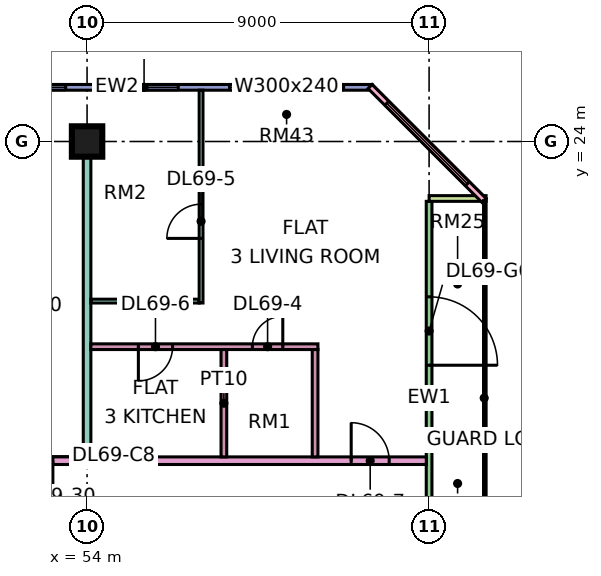
"""IFC4 building model, lengths in metres.
Left out: names, types, materials, properties, quantities, classifications, styles, units other than length and angle.
Written with IfcOpenShell. Run it as: python <this file> out.ifc"""

import sys

from ifc_helpers import new_model, si_unit, direction, frame, frame_2d, origin, origin_2d, place, context, subcontext, project, spatial, rectangle, extrude, element, fill, save


model = new_model("IFC4")
c1 = context("Model", 3, precision=1e-05, world=origin(), true_north=direction((0.0, 1.0)))
c2 = subcontext(c1, "Body", "Model", "MODEL_VIEW")
j1 = project(units=[si_unit("LENGTHUNIT", "METRE"), si_unit("PLANEANGLEUNIT", "RADIAN")], contexts=[c1])
p1 = place(None, origin())
s1 = spatial("IfcSite", under=j1, at=p1, CompositionType="ELEMENT")
p2 = place(p1, origin())
s2 = spatial("IfcBuilding", under=s1, at=p2, CompositionType="ELEMENT")
p3 = place(p2, frame((0.0, 0.0, 295.9)))
s3 = spatial("IfcBuildingStorey", under=s2, at=p3, CompositionType="ELEMENT", Elevation=295.9)
p4 = place(p3, frame((54.0, 24.0, 0.0), z_axis=(0.0, 0.0, 1.0), x_axis=(1.0, 0.0, 0.0)))
e1 = element("IfcColumn", 1, at=p4, inside=s3, PredefinedType="COLUMN", context=c2, shape_type="SweptSolid", body=[
    extrude(rectangle(XDim=0.8, YDim=0.8, at=origin_2d()), origin(), (0.0, 0.0, 1.0), 3.75),
])
p5 = place(p3, frame((61.5, 25.425, 0.0), z_axis=(0.0, 0.0, 1.0), x_axis=(-1.0, 0.0, 0.0)))
e2 = element("IfcWall", 2, at=p5, inside=s3, PredefinedType="SOLIDWALL", context=c2, shape_type="SweptSolid", body=[
    extrude(rectangle(XDim=13.425, YDim=0.15, at=frame_2d((6.712, 0.0))), origin(), (0.0, 0.0, 1.0), 3.35),
])
p6 = place(p5, frame((0.75, 0.0, 0.45)))
e3 = element("IfcOpeningElement", 3, at=p6, cuts=e2, PredefinedType="OPENING", context=c2, shape_type="SweptSolid", body=[
    extrude(rectangle(XDim=3.0, YDim=2.4, at=frame_2d((1.5, 1.2))), frame((0.0, 0.085, 0.0), z_axis=(0.0, -1.0, 0.0), x_axis=(1.0, 0.0, 0.0)), (0.0, 0.0, 1.0), 0.17),
])
p7 = place(p5, frame((5.1, 0.0, 0.45)))
e4 = element("IfcOpeningElement", 4, at=p7, cuts=e2, PredefinedType="OPENING", context=c2, shape_type="SweptSolid", body=[
    extrude(rectangle(XDim=1.8, YDim=2.4, at=frame_2d((0.9, 1.2))), frame((0.0, 0.085, 0.0), z_axis=(0.0, -1.0, 0.0), x_axis=(1.0, 0.0, 0.0)), (0.0, 0.0, 1.0), 0.17),
])
p8 = place(p5, frame((8.062, 0.0, 0.45)))
e5 = element("IfcOpeningElement", 5, at=p8, cuts=e2, PredefinedType="OPENING", context=c2, shape_type="SweptSolid", body=[
    extrude(rectangle(XDim=4.8, YDim=2.4, at=frame_2d((2.4, 1.2))), frame((0.0, 0.085, 0.0), z_axis=(0.0, -1.0, 0.0), x_axis=(1.0, 0.0, 0.0)), (0.0, 0.0, 1.0), 0.17),
])
p9 = place(p3, frame((63.0, 12.075, 0.0), z_axis=(0.0, 0.0, 1.0), x_axis=(0.0, 1.0, 0.0)))
e6 = element("IfcWall", 6, at=p9, inside=s3, PredefinedType="SOLIDWALL", context=c2, shape_type="SweptSolid", body=[
    extrude(rectangle(XDim=10.35, YDim=0.15, at=frame_2d((5.175, 0.0))), origin(), (0.0, 0.0, 1.0), 3.35),
])
p10 = place(p9, frame((6.038, 0.0, 0.0)))
e7 = element("IfcOpeningElement", 7, at=p10, cuts=e6, PredefinedType="OPENING", context=c2, shape_type="SweptSolid", body=[
    extrude(rectangle(XDim=1.8, YDim=2.4, at=frame_2d((0.9, 1.2))), frame((0.0, 0.085, 0.0), z_axis=(0.0, -1.0, 0.0), x_axis=(1.0, 0.0, 0.0)), (0.0, 0.0, 1.0), 0.17),
])
p11 = place(p3, frame((64.5, 22.5, 0.0), z_axis=(0.0, 0.0, 1.0), x_axis=(-1.0, 0.0, 0.0)))
e8 = element("IfcWall", 8, at=p11, inside=s3, PredefinedType="SOLIDWALL", context=c2, shape_type="SweptSolid", body=[
    extrude(rectangle(XDim=1.5, YDim=0.15, at=frame_2d((0.75, 0.0))), origin(), (0.0, 0.0, 1.0), 3.35),
])
p12 = place(p3, frame((64.447, 22.447, 0.0), z_axis=(0.0, 0.0, 1.0), x_axis=(-0.707106781187, 0.707106781187, 0.0)))
e9 = element("IfcWall", 9, at=p12, inside=s3, PredefinedType="SOLIDWALL", context=c2, shape_type="SweptSolid", body=[
    extrude(rectangle(XDim=4.243, YDim=0.15, at=frame_2d((2.121, 0.0))), origin(), (0.0, 0.0, 1.0), 3.35),
])
p13 = place(p12, frame((0.621, 0.0, 0.45)))
e10 = element("IfcOpeningElement", 10, at=p13, cuts=e9, PredefinedType="OPENING", context=c2, shape_type="SweptSolid", body=[
    extrude(rectangle(XDim=3.0, YDim=2.4, at=frame_2d((1.5, 1.2))), frame((0.0, 0.085, 0.0), z_axis=(0.0, -1.0, 0.0), x_axis=(1.0, 0.0, 0.0)), (0.0, 0.0, 1.0), 0.17),
])
p14 = place(p3, frame((51.225, 15.6, 0.0), z_axis=(0.0, 0.0, 1.0), x_axis=(1.0, 0.0, 0.0)))
e11 = element("IfcWall", 11, at=p14, inside=s3, PredefinedType="PARTITIONING", context=c2, shape_type="SweptSolid", body=[
    extrude(rectangle(XDim=11.701, YDim=0.2, at=frame_2d((5.851, 0.0))), origin(), (0.0, 0.0, 1.0), 3.35),
])
p15 = place(p14, frame((9.725, 0.0, 0.0)))
e12 = element("IfcOpeningElement", 12, at=p15, cuts=e11, PredefinedType="OPENING", context=c2, shape_type="SweptSolid", body=[
    extrude(rectangle(XDim=1.0, YDim=2.1, at=frame_2d((0.5, 1.05))), frame((0.0, 0.11, 0.0), z_axis=(0.0, -1.0, 0.0), x_axis=(1.0, 0.0, 0.0)), (0.0, 0.0, 1.0), 0.22),
])
p16 = place(p14, frame((0.875, 0.0, 0.0)))
e13 = element("IfcOpeningElement", 13, at=p16, cuts=e11, PredefinedType="OPENING", context=c2, shape_type="SweptSolid", body=[
    extrude(rectangle(XDim=1.0, YDim=2.1, at=frame_2d((0.5, 1.05))), frame((0.0, 0.11, 0.0), z_axis=(0.0, -1.0, 0.0), x_axis=(1.0, 0.0, 0.0)), (0.0, 0.0, 1.0), 0.22),
])
p17 = place(p3, frame((54.0, 15.7, 0.0), z_axis=(0.0, 0.0, 1.0), x_axis=(0.0, 1.0, 0.0)))
e14 = element("IfcWall", 14, at=p17, inside=s3, PredefinedType="PARTITIONING", context=c2, shape_type="SweptSolid", body=[
    extrude(rectangle(XDim=8.3, YDim=0.2, at=frame_2d((4.15, 0.0))), origin(), (0.0, 0.0, 1.0), 3.35),
])
p18 = place(p3, frame((54.1, 18.6, 0.0), z_axis=(0.0, 0.0, 1.0), x_axis=(1.0, 0.0, 0.0)))
e15 = element("IfcWall", 15, at=p18, inside=s3, PredefinedType="PARTITIONING", context=c2, shape_type="SweptSolid", body=[
    extrude(rectangle(XDim=5.975, YDim=0.15, at=frame_2d((2.987, 0.0))), origin(), (0.0, 0.0, 1.0), 3.35),
])
p19 = place(p18, frame((4.25, 0.0, 0.0)))
e16 = element("IfcOpeningElement", 16, at=p19, cuts=e15, PredefinedType="OPENING", context=c2, shape_type="SweptSolid", body=[
    extrude(rectangle(XDim=0.8, YDim=2.1, at=frame_2d((0.4, 1.05))), frame((0.0, 0.085, 0.0), z_axis=(0.0, -1.0, 0.0), x_axis=(1.0, 0.0, 0.0)), (0.0, 0.0, 1.0), 0.17),
])
p20 = place(p18, frame((1.25, 0.0, 0.0)))
e17 = element("IfcOpeningElement", 17, at=p20, cuts=e15, PredefinedType="OPENING", context=c2, shape_type="SweptSolid", body=[
    extrude(rectangle(XDim=0.9, YDim=2.1, at=frame_2d((0.45, 1.05))), frame((0.0, 0.085, 0.0), z_axis=(0.0, -1.0, 0.0), x_axis=(1.0, 0.0, 0.0)), (0.0, 0.0, 1.0), 0.17),
])
p21 = place(p3, frame((54.1, 19.8, 0.0), z_axis=(0.0, 0.0, 1.0), x_axis=(1.0, 0.0, 0.0)))
e18 = element("IfcWall", 18, at=p21, inside=s3, PredefinedType="PARTITIONING", context=c2, shape_type="SweptSolid", body=[
    extrude(rectangle(XDim=2.85, YDim=0.1, at=frame_2d((1.425, 0.0))), origin(), (0.0, 0.0, 1.0), 3.35),
])
p22 = place(p3, frame((57.0, 19.75, 0.0), z_axis=(0.0, 0.0, 1.0), x_axis=(0.0, 1.0, 0.0)))
e19 = element("IfcWall", 19, at=p22, inside=s3, PredefinedType="PARTITIONING", context=c2, shape_type="SweptSolid", body=[
    extrude(rectangle(XDim=5.6, YDim=0.1, at=frame_2d((2.8, 0.0))), origin(), (0.0, 0.0, 1.0), 3.35),
])
p23 = place(p22, frame((1.7, 0.0, 0.0)))
e20 = element("IfcOpeningElement", 20, at=p23, cuts=e19, PredefinedType="OPENING", context=c2, shape_type="SweptSolid", body=[
    extrude(rectangle(XDim=0.9, YDim=2.1, at=frame_2d((0.45, 1.05))), frame((0.0, 0.06, 0.0), z_axis=(0.0, -1.0, 0.0), x_axis=(1.0, 0.0, 0.0)), (0.0, 0.0, 1.0), 0.12),
])
for number, where, z_axis, x_axis in (
    (21, (57.6, 15.7, 0.0), (0.0, 0.0, 1.0), (0.0, 1.0, 0.0)),
    (22, (60.0, 15.7, 0.0), (0.0, 0.0, 1.0), (0.0, 1.0, 0.0)),
):
    element("IfcWall", number, at=place(p3, frame(where, z_axis=z_axis, x_axis=x_axis)), inside=s3, PredefinedType="PARTITIONING", context=c2, shape_type="SweptSolid", body=[
        extrude(rectangle(XDim=2.825, YDim=0.15, at=frame_2d((1.413, 0.0))), origin(), (0.0, 0.0, 1.0), 3.35),
    ])
p24 = place(p6, origin())
e23 = element("IfcWindow", 23, at=p24, inside=s3, PartitioningType="SINGLE_PANEL", PredefinedType="WINDOW", context=c2, shape_type="SweptSolid", body=[
    extrude(rectangle(XDim=3.0, YDim=2.4, at=frame_2d((1.5, 1.2))), frame((0.0, 0.03, 0.0), z_axis=(0.0, -1.0, 0.0), x_axis=(1.0, 0.0, 0.0)), (0.0, 0.0, 1.0), 0.06),
])
fill(e3, e23)
p25 = place(p7, origin())
e24 = element("IfcWindow", 24, at=p25, inside=s3, PartitioningType="SINGLE_PANEL", PredefinedType="WINDOW", context=c2, shape_type="SweptSolid", body=[
    extrude(rectangle(XDim=1.8, YDim=2.4, at=frame_2d((0.9, 1.2))), frame((0.0, 0.03, 0.0), z_axis=(0.0, -1.0, 0.0), x_axis=(1.0, 0.0, 0.0)), (0.0, 0.0, 1.0), 0.06),
])
fill(e4, e24)
p26 = place(p8, origin())
e25 = element("IfcWindow", 25, at=p26, inside=s3, PartitioningType="SINGLE_PANEL", PredefinedType="WINDOW", context=c2, shape_type="SweptSolid", body=[
    extrude(rectangle(XDim=4.8, YDim=2.4, at=frame_2d((2.4, 1.2))), frame((0.0, 0.03, 0.0), z_axis=(0.0, -1.0, 0.0), x_axis=(1.0, 0.0, 0.0)), (0.0, 0.0, 1.0), 0.06),
])
fill(e5, e25)
p27 = place(p10, frame((1.8, 0.0, 0.0), z_axis=(0.0, 0.0, 1.0), x_axis=(-1.0, 0.0, 0.0)))
e26 = element("IfcDoor", 26, at=p27, inside=s3, OperationType="DOUBLE_DOOR_SINGLE_SWING", PredefinedType="DOOR", context=c2, shape_type="SweptSolid", body=[
    extrude(rectangle(XDim=1.8, YDim=2.4, at=frame_2d((0.9, 1.2))), frame((0.0, 0.025, 0.0), z_axis=(0.0, -1.0, 0.0), x_axis=(1.0, 0.0, 0.0)), (0.0, 0.0, 1.0), 0.05),
])
fill(e7, e26)
p28 = place(p13, origin())
e27 = element("IfcWindow", 27, at=p28, inside=s3, PartitioningType="SINGLE_PANEL", PredefinedType="WINDOW", context=c2, shape_type="SweptSolid", body=[
    extrude(rectangle(XDim=3.0, YDim=2.4, at=frame_2d((1.5, 1.2))), frame((0.0, 0.03, 0.0), z_axis=(0.0, -1.0, 0.0), x_axis=(1.0, 0.0, 0.0)), (0.0, 0.0, 1.0), 0.06),
])
fill(e10, e27)
p29 = place(p19, frame((0.8, 0.0, 0.0), z_axis=(0.0, 0.0, 1.0), x_axis=(-1.0, 0.0, 0.0)))
e28 = element("IfcDoor", 28, at=p29, inside=s3, OperationType="SINGLE_SWING_RIGHT", PredefinedType="DOOR", context=c2, shape_type="SweptSolid", body=[
    extrude(rectangle(XDim=0.8, YDim=2.1, at=frame_2d((0.4, 1.05))), frame((0.0, 0.025, 0.0), z_axis=(0.0, -1.0, 0.0), x_axis=(1.0, 0.0, 0.0)), (0.0, 0.0, 1.0), 0.05),
])
fill(e16, e28)
p30 = place(p23, origin())
e29 = element("IfcDoor", 29, at=p30, inside=s3, OperationType="SINGLE_SWING_LEFT", PredefinedType="DOOR", context=c2, shape_type="SweptSolid", body=[
    extrude(rectangle(XDim=0.9, YDim=2.1, at=frame_2d((0.45, 1.05))), frame((0.0, 0.025, 0.0), z_axis=(0.0, -1.0, 0.0), x_axis=(1.0, 0.0, 0.0)), (0.0, 0.0, 1.0), 0.05),
])
fill(e20, e29)
p31 = place(p20, frame((0.9, 0.0, 0.0), z_axis=(0.0, 0.0, 1.0), x_axis=(-1.0, 0.0, 0.0)))
e30 = element("IfcDoor", 30, at=p31, inside=s3, OperationType="SINGLE_SWING_LEFT", PredefinedType="DOOR", context=c2, shape_type="SweptSolid", body=[
    extrude(rectangle(XDim=0.9, YDim=2.1, at=frame_2d((0.45, 1.05))), frame((0.0, 0.025, 0.0), z_axis=(0.0, -1.0, 0.0), x_axis=(1.0, 0.0, 0.0)), (0.0, 0.0, 1.0), 0.05),
])
fill(e17, e30)
p32 = place(p15, origin())
e31 = element("IfcDoor", 31, at=p32, inside=s3, OperationType="SINGLE_SWING_LEFT", PredefinedType="DOOR", context=c2, shape_type="SweptSolid", body=[
    extrude(rectangle(XDim=1.0, YDim=2.1, at=frame_2d((0.5, 1.05))), frame((0.0, 0.025, 0.0), z_axis=(0.0, -1.0, 0.0), x_axis=(1.0, 0.0, 0.0)), (0.0, 0.0, 1.0), 0.05),
])
fill(e12, e31)
p33 = place(p16, origin())
e32 = element("IfcDoor", 32, at=p33, inside=s3, OperationType="SINGLE_SWING_RIGHT", PredefinedType="DOOR", context=c2, shape_type="SweptSolid", body=[
    extrude(rectangle(XDim=1.0, YDim=2.1, at=frame_2d((0.5, 1.05))), frame((0.0, 0.025, 0.0), z_axis=(0.0, -1.0, 0.0), x_axis=(1.0, 0.0, 0.0)), (0.0, 0.0, 1.0), 0.05),
])
fill(e13, e32)
save(model, sys.argv[1])
